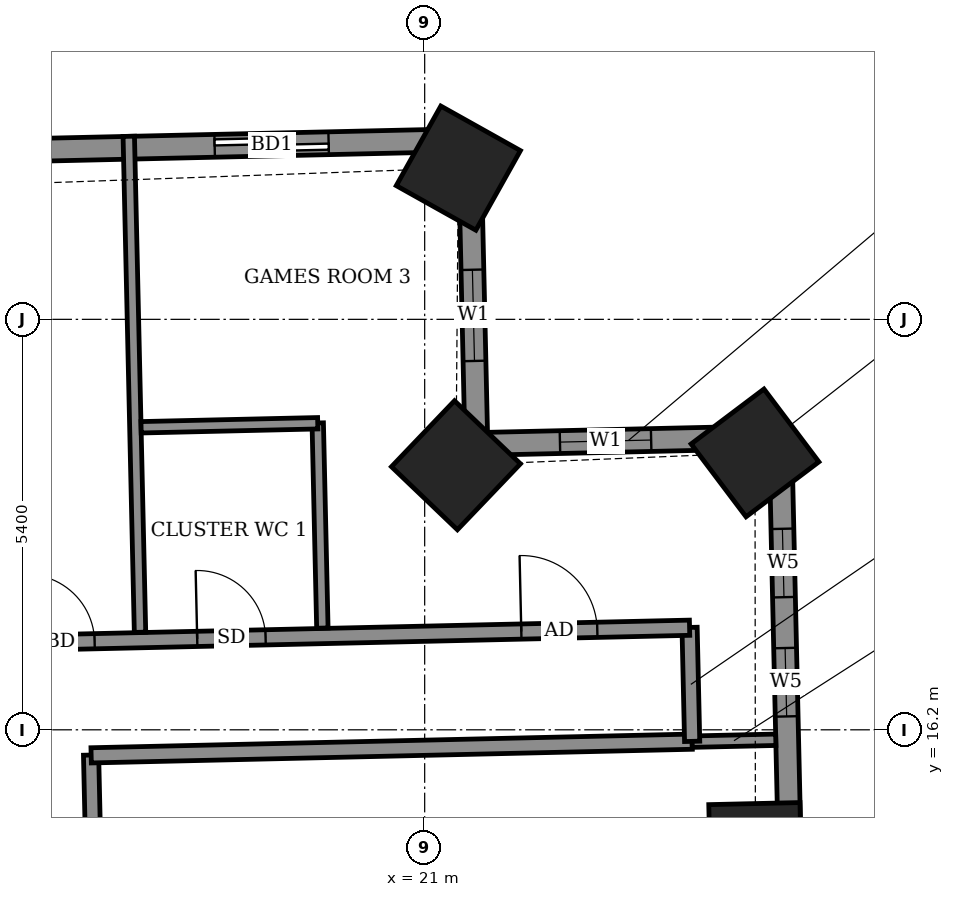
"""IFC4 building model, lengths in metres.
Left out: names, types, materials, properties, quantities, classifications, styles, units other than length and angle.
Written with IfcOpenShell. Run it as: python <this file> out.ifc"""

import sys

from ifc_helpers import new_model, si_unit, direction, frame, frame_2d, origin, origin_2d, place, context, subcontext, project, spatial, rectangle, extrude, element, fill, save


model = new_model("IFC4")
c1 = context("Model", 3, precision=1e-05, world=origin(), true_north=direction((0.0, 1.0)))
c2 = subcontext(c1, "Body", "Model", "MODEL_VIEW")
j1 = project(units=[si_unit("LENGTHUNIT", "METRE"), si_unit("PLANEANGLEUNIT", "RADIAN")], contexts=[c1])
p1 = place(None, origin())
s1 = spatial("IfcSite", under=j1, at=p1, CompositionType="ELEMENT")
p2 = place(p1, origin())
s2 = spatial("IfcBuilding", under=s1, at=p2, CompositionType="ELEMENT")
p3 = place(p2, frame((0.0, 0.0, 182.5)))
s3 = spatial("IfcBuildingStorey", under=s2, at=p3, CompositionType="ELEMENT", Elevation=182.5)
for number, where, z_axis, x_axis in (
    (1, (25.351, 14.629, -0.55), (0.0, 0.0, 1.0), (-0.023, 1.0, 0.0)),
    (2, (25.346, 19.843, -0.55), (0.0, 0.0, 1.0), (-0.602, 0.798, 0.0)),
    (3, (21.411, 19.68, -0.55), (0.0, 0.0, 1.0), (-0.723, 0.691, 0.0)),
    (4, (21.443, 23.589, -0.55), (0.0, 0.0, 1.0), (-0.873, 0.488, 0.0)),
):
    element("IfcColumn", number, at=place(p3, frame(where, z_axis=z_axis, x_axis=x_axis)), inside=s3, PredefinedType="COLUMN", context=c2, shape_type="SweptSolid", body=[
        extrude(rectangle(XDim=1.2, YDim=1.2, at=origin_2d()), origin(), (0.0, 0.0, 1.0), 3.6),
    ])
p4 = place(p3, frame((25.929, 9.025, 0.0), z_axis=(0.0, 0.0, 1.0), x_axis=(-0.022667601583, 0.999743056909, 0.0)))
e5 = element("IfcWall", 5, at=p4, inside=s3, PredefinedType="SOLIDWALL", context=c2, shape_type="SweptSolid", body=[
    extrude(rectangle(XDim=11.029, YDim=0.3, at=frame_2d((5.515, 0.0))), origin(), (0.0, 0.0, 1.0), 3.05),
])
p5 = place(p4, frame((2.086, 0.0, 0.0)))
e6 = element("IfcOpeningElement", 6, at=p5, cuts=e5, PredefinedType="OPENING", context=c2, shape_type="SweptSolid", body=[
    extrude(rectangle(XDim=1.5, YDim=2.4, at=frame_2d((0.75, 1.2))), frame((0.0, 0.16, 0.0), z_axis=(0.0, -1.0, 0.0), x_axis=(1.0, 0.0, 0.0)), (0.0, 0.0, 1.0), 0.32),
])
p6 = place(p4, frame((7.353, 0.0, 0.9)))
e7 = element("IfcOpeningElement", 7, at=p6, cuts=e5, PredefinedType="OPENING", context=c2, shape_type="SweptSolid", body=[
    extrude(rectangle(XDim=0.9, YDim=1.5, at=frame_2d((0.45, 0.75))), frame((0.0, 0.16, 0.0), z_axis=(0.0, -1.0, 0.0), x_axis=(1.0, 0.0, 0.0)), (0.0, 0.0, 1.0), 0.32),
])
p7 = place(p4, frame((8.922, 0.0, 0.9)))
e8 = element("IfcOpeningElement", 8, at=p7, cuts=e5, PredefinedType="OPENING", context=c2, shape_type="SweptSolid", body=[
    extrude(rectangle(XDim=0.9, YDim=1.5, at=frame_2d((0.45, 0.75))), frame((0.0, 0.16, 0.0), z_axis=(0.0, -1.0, 0.0), x_axis=(1.0, 0.0, 0.0)), (0.0, 0.0, 1.0), 0.32),
])
p8 = place(p3, frame((25.679, 20.051, 0.0), z_axis=(0.0, 0.0, 1.0), x_axis=(-0.999740826251, -0.022765770952, 0.0)))
e9 = element("IfcWall", 9, at=p8, inside=s3, PredefinedType="SOLIDWALL", context=c2, shape_type="SweptSolid", body=[
    extrude(rectangle(XDim=4.0, YDim=0.3, at=frame_2d((2.0, 0.0))), origin(), (0.0, 0.0, 1.0), 2.55),
])
p9 = place(p8, frame((1.7, 0.0, 0.9)))
e10 = element("IfcOpeningElement", 10, at=p9, cuts=e9, PredefinedType="OPENING", context=c2, shape_type="SweptSolid", body=[
    extrude(rectangle(XDim=1.2, YDim=1.5, at=frame_2d((0.6, 0.75))), frame((0.0, 0.16, 0.0), z_axis=(0.0, -1.0, 0.0), x_axis=(1.0, 0.0, 0.0)), (0.0, 0.0, 1.0), 0.32),
])
p10 = place(p3, frame((21.68, 19.96, 0.0), z_axis=(0.0, 0.0, 1.0), x_axis=(-0.022704768219, 0.999742213523, 0.0)))
e11 = element("IfcWall", 11, at=p10, inside=s3, PredefinedType="SOLIDWALL", context=c2, shape_type="SweptSolid", body=[
    extrude(rectangle(XDim=4.0, YDim=0.3, at=frame_2d((2.0, 0.0))), origin(), (0.0, 0.0, 1.0), 2.55),
])
p11 = place(p10, frame((1.093, 0.0, 0.9)))
e12 = element("IfcOpeningElement", 12, at=p11, cuts=e11, PredefinedType="OPENING", context=c2, shape_type="SweptSolid", body=[
    extrude(rectangle(XDim=1.2, YDim=1.5, at=frame_2d((0.6, 0.75))), frame((0.0, 0.16, 0.0), z_axis=(0.0, -1.0, 0.0), x_axis=(1.0, 0.0, 0.0)), (0.0, 0.0, 1.0), 0.32),
])
p12 = place(p3, frame((21.589, 23.959, 0.0), z_axis=(0.0, 0.0, 1.0), x_axis=(-0.999742671382, -0.022684598702, 0.0)))
e13 = element("IfcWall", 13, at=p12, inside=s3, PredefinedType="SOLIDWALL", context=c2, shape_type="SweptSolid", body=[
    extrude(rectangle(XDim=40.381, YDim=0.3, at=frame_2d((20.19, 0.0))), origin(), (0.0, 0.0, 1.0), 3.05),
])
p13 = place(p12, frame((1.853, 0.0, 0.0)))
e14 = element("IfcOpeningElement", 14, at=p13, cuts=e13, PredefinedType="OPENING", context=c2, shape_type="SweptSolid", body=[
    extrude(rectangle(XDim=1.5, YDim=2.4, at=frame_2d((0.75, 1.2))), frame((0.0, 0.16, 0.0), z_axis=(0.0, -1.0, 0.0), x_axis=(1.0, 0.0, 0.0)), (0.0, 0.0, 1.0), 0.32),
])
p14 = place(p12, frame((7.38, 0.0, 0.0)))
e15 = element("IfcOpeningElement", 15, at=p14, cuts=e13, PredefinedType="OPENING", context=c2, shape_type="SweptSolid", body=[
    extrude(rectangle(XDim=1.2, YDim=2.4, at=frame_2d((0.6, 1.2))), frame((0.0, 0.16, 0.0), z_axis=(0.0, -1.0, 0.0), x_axis=(1.0, 0.0, 0.0)), (0.0, 0.0, 1.0), 0.32),
])
p15 = place(p12, frame((10.27, 0.0, 0.0)))
e16 = element("IfcOpeningElement", 16, at=p15, cuts=e13, PredefinedType="OPENING", context=c2, shape_type="SweptSolid", body=[
    extrude(rectangle(XDim=1.5, YDim=2.4, at=frame_2d((0.75, 1.2))), frame((0.0, 0.16, 0.0), z_axis=(0.0, -1.0, 0.0), x_axis=(1.0, 0.0, 0.0)), (0.0, 0.0, 1.0), 0.32),
])
p16 = place(p12, frame((15.095, 0.0, 0.0)))
e17 = element("IfcOpeningElement", 17, at=p16, cuts=e13, PredefinedType="OPENING", context=c2, shape_type="SweptSolid", body=[
    extrude(rectangle(XDim=1.5, YDim=2.4, at=frame_2d((0.75, 1.2))), frame((0.0, 0.16, 0.0), z_axis=(0.0, -1.0, 0.0), x_axis=(1.0, 0.0, 0.0)), (0.0, 0.0, 1.0), 0.32),
])
p17 = place(p12, frame((20.935, 0.0, 0.0)))
e18 = element("IfcOpeningElement", 18, at=p17, cuts=e13, PredefinedType="OPENING", context=c2, shape_type="SweptSolid", body=[
    extrude(rectangle(XDim=1.2, YDim=2.4, at=frame_2d((0.6, 1.2))), frame((0.0, 0.16, 0.0), z_axis=(0.0, -1.0, 0.0), x_axis=(1.0, 0.0, 0.0)), (0.0, 0.0, 1.0), 0.32),
])
p18 = place(p12, frame((23.825, 0.0, 0.0)))
e19 = element("IfcOpeningElement", 19, at=p18, cuts=e13, PredefinedType="OPENING", context=c2, shape_type="SweptSolid", body=[
    extrude(rectangle(XDim=1.5, YDim=2.4, at=frame_2d((0.75, 1.2))), frame((0.0, 0.16, 0.0), z_axis=(0.0, -1.0, 0.0), x_axis=(1.0, 0.0, 0.0)), (0.0, 0.0, 1.0), 0.32),
])
p19 = place(p12, frame((28.65, 0.0, 0.0)))
e20 = element("IfcOpeningElement", 20, at=p19, cuts=e13, PredefinedType="OPENING", context=c2, shape_type="SweptSolid", body=[
    extrude(rectangle(XDim=1.5, YDim=2.4, at=frame_2d((0.75, 1.2))), frame((0.0, 0.16, 0.0), z_axis=(0.0, -1.0, 0.0), x_axis=(1.0, 0.0, 0.0)), (0.0, 0.0, 1.0), 0.32),
])
p20 = place(p12, frame((31.84, 0.0, 0.0)))
e21 = element("IfcOpeningElement", 21, at=p20, cuts=e13, PredefinedType="OPENING", context=c2, shape_type="SweptSolid", body=[
    extrude(rectangle(XDim=1.2, YDim=2.4, at=frame_2d((0.6, 1.2))), frame((0.0, 0.16, 0.0), z_axis=(0.0, -1.0, 0.0), x_axis=(1.0, 0.0, 0.0)), (0.0, 0.0, 1.0), 0.32),
])
p21 = place(p12, frame((36.57, 0.0, 0.9)))
e22 = element("IfcOpeningElement", 22, at=p21, cuts=e13, PredefinedType="OPENING", context=c2, shape_type="SweptSolid", body=[
    extrude(rectangle(XDim=2.4, YDim=1.5, at=frame_2d((1.2, 0.75))), frame((0.0, 0.16, 0.0), z_axis=(0.0, -1.0, 0.0), x_axis=(1.0, 0.0, 0.0)), (0.0, 0.0, 1.0), 0.32),
])
p22 = place(p3, frame((16.797, 7.674, 0.0), z_axis=(0.0, 0.0, 1.0), x_axis=(-0.022698399288, 0.999742358145, 0.0)))
e23 = element("IfcWall", 23, at=p22, inside=s3, PredefinedType="PARTITIONING", context=c2, shape_type="SweptSolid", body=[
    extrude(rectangle(XDim=8.196, YDim=0.2, at=frame_2d((4.098, 0.0))), origin(), (0.0, 0.0, 1.0), 3.05),
])
p23 = place(p22, frame((3.683, 0.0, 0.0)))
e24 = element("IfcOpeningElement", 24, at=p23, cuts=e23, PredefinedType="OPENING", context=c2, shape_type="SweptSolid", body=[
    extrude(rectangle(XDim=1.0, YDim=2.1, at=frame_2d((0.5, 1.05))), frame((0.0, 0.11, 0.0), z_axis=(0.0, -1.0, 0.0), x_axis=(1.0, 0.0, 0.0)), (0.0, 0.0, 1.0), 0.22),
])
p24 = place(p3, frame((16.612, 15.864, 0.0), z_axis=(0.0, 0.0, 1.0), x_axis=(0.999741181744, 0.022750154412, 0.0)))
e25 = element("IfcWall", 25, at=p24, inside=s3, PredefinedType="PARTITIONING", context=c2, shape_type="SweptSolid", body=[
    extrude(rectangle(XDim=7.909, YDim=0.2, at=frame_2d((3.955, 0.0))), origin(), (0.0, 0.0, 1.0), 3.05),
])
p25 = place(p3, frame((24.519, 16.044, 0.0), z_axis=(0.0, 0.0, 1.0), x_axis=(0.999738732953, 0.022857511541, 0.0)))
e26 = element("IfcWall", 26, at=p25, inside=s3, PredefinedType="PARTITIONING", context=c2, shape_type="SweptSolid", body=[
    extrude(rectangle(XDim=1.1, YDim=0.15, at=frame_2d((0.55, 0.0))), origin(), (0.0, 0.0, 1.0), 2.55),
])
p26 = place(p3, frame((24.519, 16.048, 0.0), z_axis=(0.0, 0.0, 1.0), x_axis=(-0.022632637625, 0.99974384905, 0.0)))
e27 = element("IfcWall", 27, at=p26, inside=s3, PredefinedType="PARTITIONING", context=c2, shape_type="SweptSolid", body=[
    extrude(rectangle(XDim=1.5, YDim=0.2, at=frame_2d((0.75, 0.0))), origin(), (0.0, 0.0, 1.0), 3.05),
])
p27 = place(p3, frame((14.88, 17.325, 0.0), z_axis=(0.0, 0.0, 1.0), x_axis=(0.999742504166, 0.022691966963, 0.0)))
e28 = element("IfcWall", 28, at=p27, inside=s3, PredefinedType="PARTITIONING", context=c2, shape_type="SweptSolid", body=[
    extrude(rectangle(XDim=9.608, YDim=0.2, at=frame_2d((4.804, 0.0))), origin(), (0.0, 0.0, 1.0), 3.05),
])
p28 = place(p27, frame((7.393, 0.0, 0.0)))
e29 = element("IfcOpeningElement", 29, at=p28, cuts=e28, PredefinedType="OPENING", context=c2, shape_type="SweptSolid", body=[
    extrude(rectangle(XDim=1.0, YDim=2.1, at=frame_2d((0.5, 1.05))), frame((0.0, 0.11, 0.0), z_axis=(0.0, -1.0, 0.0), x_axis=(1.0, 0.0, 0.0)), (0.0, 0.0, 1.0), 0.22),
])
p29 = place(p27, frame((3.128, 0.0, 0.0)))
e30 = element("IfcOpeningElement", 30, at=p29, cuts=e28, PredefinedType="OPENING", context=c2, shape_type="SweptSolid", body=[
    extrude(rectangle(XDim=0.9, YDim=2.1, at=frame_2d((0.45, 1.05))), frame((0.0, 0.11, 0.0), z_axis=(0.0, -1.0, 0.0), x_axis=(1.0, 0.0, 0.0)), (0.0, 0.0, 1.0), 0.22),
])
p30 = place(p27, frame((0.878, 0.0, 0.0)))
e31 = element("IfcOpeningElement", 31, at=p30, cuts=e28, PredefinedType="OPENING", context=c2, shape_type="SweptSolid", body=[
    extrude(rectangle(XDim=0.9, YDim=2.1, at=frame_2d((0.45, 1.05))), frame((0.0, 0.11, 0.0), z_axis=(0.0, -1.0, 0.0), x_axis=(1.0, 0.0, 0.0)), (0.0, 0.0, 1.0), 0.22),
])
p31 = place(p3, frame((17.255, 17.483, 0.0), z_axis=(0.0, 0.0, 1.0), x_axis=(-0.022667874761, 0.999743050715, 0.0)))
e32 = element("IfcWall", 32, at=p31, inside=s3, PredefinedType="PARTITIONING", context=c2, shape_type="SweptSolid", body=[
    extrude(rectangle(XDim=6.527, YDim=0.15, at=frame_2d((3.263, 0.0))), origin(), (0.0, 0.0, 1.0), 2.55),
])
p32 = place(p3, frame((19.654, 17.538, 0.0), z_axis=(0.0, 0.0, 1.0), x_axis=(-0.02260842146, 0.999744396973, 0.0)))
e33 = element("IfcWall", 33, at=p32, inside=s3, PredefinedType="PARTITIONING", context=c2, shape_type="SweptSolid", body=[
    extrude(rectangle(XDim=2.7, YDim=0.15, at=frame_2d((1.35, 0.0))), origin(), (0.0, 0.0, 1.0), 3.05),
])
p33 = place(p3, frame((17.269, 20.18, 0.0), z_axis=(0.0, 0.0, 1.0), x_axis=(0.999740260747, 0.02279059109, 0.0)))
e34 = element("IfcWall", 34, at=p33, inside=s3, PredefinedType="PARTITIONING", context=c2, shape_type="SweptSolid", body=[
    extrude(rectangle(XDim=2.324, YDim=0.15, at=frame_2d((1.162, 0.0))), origin(), (0.0, 0.0, 1.0), 3.05),
])
p34 = place(p6, origin())
e35 = element("IfcWindow", 35, at=p34, inside=s3, PartitioningType="SINGLE_PANEL", PredefinedType="WINDOW", context=c2, shape_type="SweptSolid", body=[
    extrude(rectangle(XDim=0.9, YDim=1.5, at=frame_2d((0.45, 0.75))), frame((0.0, 0.03, 0.0), z_axis=(0.0, -1.0, 0.0), x_axis=(1.0, 0.0, 0.0)), (0.0, 0.0, 1.0), 0.06),
])
fill(e7, e35)
p35 = place(p7, origin())
e36 = element("IfcWindow", 36, at=p35, inside=s3, PartitioningType="SINGLE_PANEL", PredefinedType="WINDOW", context=c2, shape_type="SweptSolid", body=[
    extrude(rectangle(XDim=0.9, YDim=1.5, at=frame_2d((0.45, 0.75))), frame((0.0, 0.03, 0.0), z_axis=(0.0, -1.0, 0.0), x_axis=(1.0, 0.0, 0.0)), (0.0, 0.0, 1.0), 0.06),
])
fill(e8, e36)
p36 = place(p9, origin())
e37 = element("IfcWindow", 37, at=p36, inside=s3, PartitioningType="SINGLE_PANEL", PredefinedType="WINDOW", context=c2, shape_type="SweptSolid", body=[
    extrude(rectangle(XDim=1.2, YDim=1.5, at=frame_2d((0.6, 0.75))), frame((0.0, 0.03, 0.0), z_axis=(0.0, -1.0, 0.0), x_axis=(1.0, 0.0, 0.0)), (0.0, 0.0, 1.0), 0.06),
])
fill(e10, e37)
p37 = place(p11, origin())
e38 = element("IfcWindow", 38, at=p37, inside=s3, PartitioningType="SINGLE_PANEL", PredefinedType="WINDOW", context=c2, shape_type="SweptSolid", body=[
    extrude(rectangle(XDim=1.2, YDim=1.5, at=frame_2d((0.6, 0.75))), frame((0.0, 0.03, 0.0), z_axis=(0.0, -1.0, 0.0), x_axis=(1.0, 0.0, 0.0)), (0.0, 0.0, 1.0), 0.06),
])
fill(e12, e38)
p38 = place(p13, origin())
e39 = element("IfcDoor", 39, at=p38, inside=s3, OperationType="SLIDING_TO_LEFT", PredefinedType="DOOR", context=c2, shape_type="SweptSolid", body=[
    extrude(rectangle(XDim=1.5, YDim=2.4, at=frame_2d((0.75, 1.2))), frame((0.0, 0.025, 0.0), z_axis=(0.0, -1.0, 0.0), x_axis=(1.0, 0.0, 0.0)), (0.0, 0.0, 1.0), 0.05),
])
fill(e14, e39)
p39 = place(p28, origin())
e40 = element("IfcDoor", 40, at=p39, inside=s3, OperationType="SINGLE_SWING_LEFT", PredefinedType="DOOR", context=c2, shape_type="SweptSolid", body=[
    extrude(rectangle(XDim=1.0, YDim=2.1, at=frame_2d((0.5, 1.05))), frame((0.0, 0.025, 0.0), z_axis=(0.0, -1.0, 0.0), x_axis=(1.0, 0.0, 0.0)), (0.0, 0.0, 1.0), 0.05),
])
fill(e29, e40)
p40 = place(p29, origin())
e41 = element("IfcDoor", 41, at=p40, inside=s3, OperationType="SINGLE_SWING_LEFT", PredefinedType="DOOR", context=c2, shape_type="SweptSolid", body=[
    extrude(rectangle(XDim=0.9, YDim=2.1, at=frame_2d((0.45, 1.05))), frame((0.0, 0.025, 0.0), z_axis=(0.0, -1.0, 0.0), x_axis=(1.0, 0.0, 0.0)), (0.0, 0.0, 1.0), 0.05),
])
fill(e30, e41)
p41 = place(p30, origin())
e42 = element("IfcDoor", 42, at=p41, inside=s3, OperationType="SINGLE_SWING_RIGHT", PredefinedType="DOOR", context=c2, shape_type="SweptSolid", body=[
    extrude(rectangle(XDim=0.9, YDim=2.1, at=frame_2d((0.45, 1.05))), frame((0.0, 0.025, 0.0), z_axis=(0.0, -1.0, 0.0), x_axis=(1.0, 0.0, 0.0)), (0.0, 0.0, 1.0), 0.05),
])
fill(e31, e42)
save(model, sys.argv[1])
